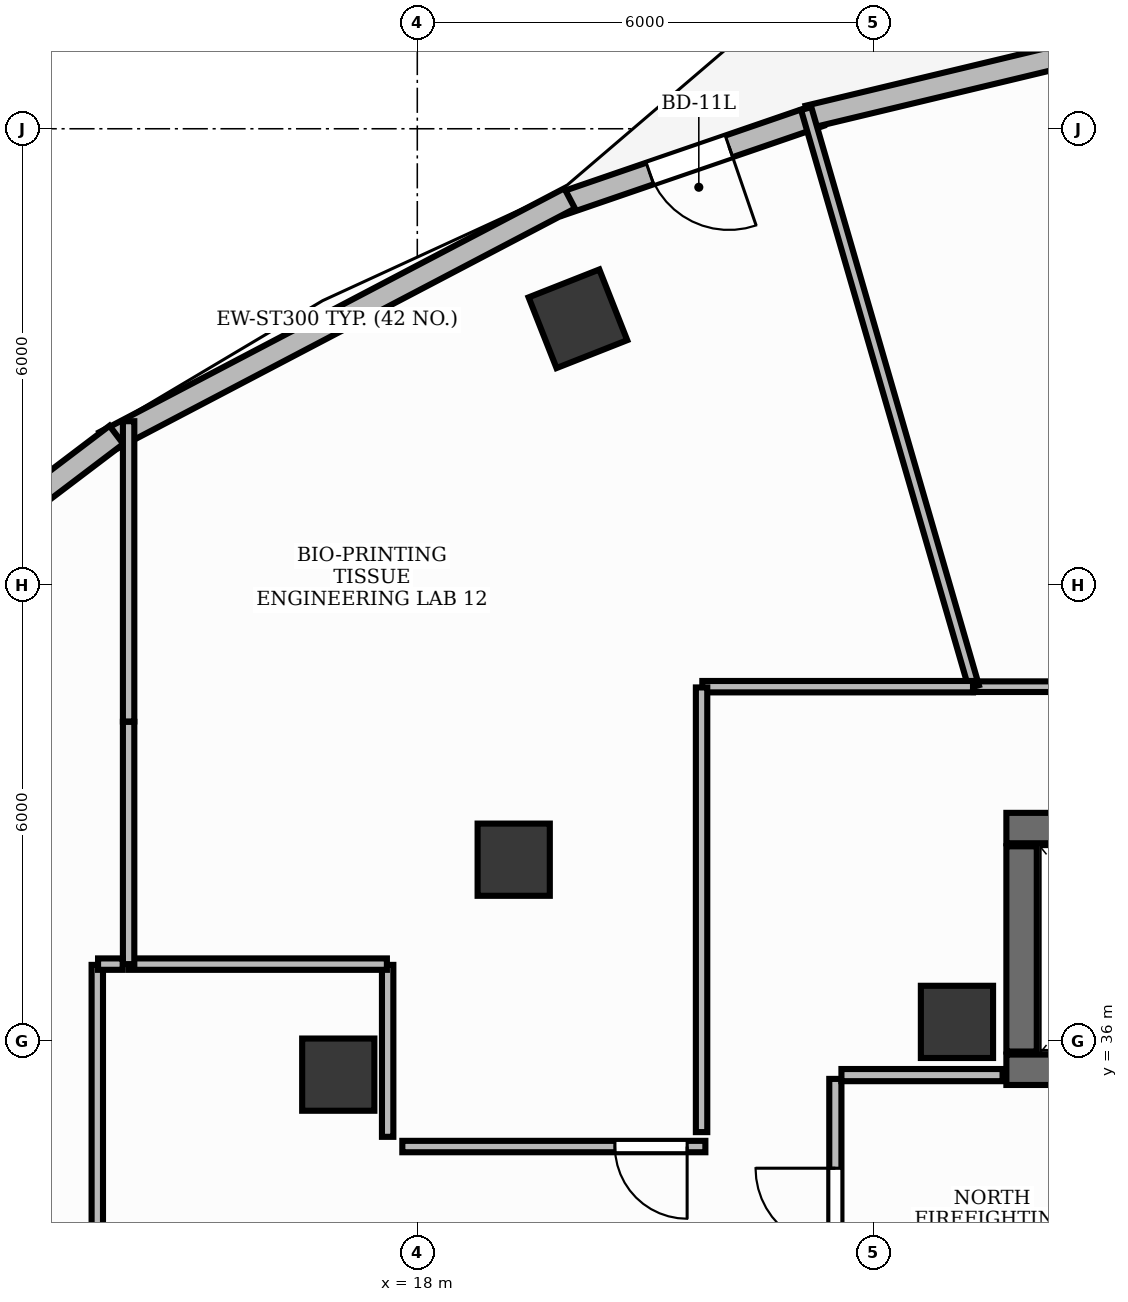
"""IFC4 building model, lengths in metres.
Left out: names, types, materials, properties, quantities, classifications, styles, units other than length and angle.
Written with IfcOpenShell. Run it as: python <this file> out.ifc"""

import sys

from ifc_helpers import new_model, si_unit, direction, frame, frame_2d, origin, origin_2d, place, context, subcontext, project, spatial, rectangle, extrude, element, fill, save


model = new_model("IFC4")
c1 = context("Model", 3, precision=1e-05, world=origin(), true_north=direction((0.0, 1.0)))
c2 = subcontext(c1, "Body", "Model", "MODEL_VIEW")
j1 = project(units=[si_unit("LENGTHUNIT", "METRE"), si_unit("PLANEANGLEUNIT", "RADIAN")], contexts=[c1])
p1 = place(None, origin())
s1 = spatial("IfcSite", under=j1, at=p1, CompositionType="ELEMENT")
p2 = place(p1, origin())
s2 = spatial("IfcBuilding", under=s1, at=p2, CompositionType="ELEMENT")
p3 = place(p2, frame((0.0, 0.0, 239.4)))
s3 = spatial("IfcBuildingStorey", under=s2, at=p3, CompositionType="ELEMENT", Elevation=239.4)
p4 = place(p3, frame((25.75, 38.8, 0.0), z_axis=(0.0, 0.0, 1.0), x_axis=(1.0, 0.0, 0.0)))
e1 = element("IfcWall", 1, at=p4, inside=s3, PredefinedType="SHEAR", context=c2, shape_type="SweptSolid", body=[
    extrude(rectangle(XDim=3.1, YDim=0.4, at=frame_2d((1.55, 0.0))), origin(), (0.0, 0.0, 1.0), 3.9),
])
p5 = place(p3, frame((25.75, 35.62, 0.0), z_axis=(0.0, 0.0, 1.0), x_axis=(1.0, 0.0, 0.0)))
e2 = element("IfcWall", 2, at=p5, inside=s3, PredefinedType="SHEAR", context=c2, shape_type="SweptSolid", body=[
    extrude(rectangle(XDim=3.1, YDim=0.4, at=frame_2d((1.55, 0.0))), origin(), (0.0, 0.0, 1.0), 3.9),
])
p6 = place(p5, frame((0.9, 0.0, 0.0)))
e3 = element("IfcOpeningElement", 3, at=p6, cuts=e2, PredefinedType="OPENING", context=c2, shape_type="SweptSolid", body=[
    extrude(rectangle(XDim=1.3, YDim=2.2, at=frame_2d((0.65, 1.1))), frame((0.0, 0.215, 0.0), z_axis=(0.0, -1.0, 0.0), x_axis=(1.0, 0.0, 0.0)), (0.0, 0.0, 1.0), 0.43),
])
p7 = place(p3, frame((25.95, 35.86, 0.0), z_axis=(0.0, 0.0, 1.0), x_axis=(0.0, 1.0, 0.0)))
e4 = element("IfcWall", 4, at=p7, inside=s3, PredefinedType="SHEAR", context=c2, shape_type="SweptSolid", body=[
    extrude(rectangle(XDim=2.7, YDim=0.4, at=frame_2d((1.35, 0.0))), origin(), (0.0, 0.0, 1.0), 3.9),
])
p8 = place(p3, frame((25.1, 36.25, -0.0), z_axis=(0.0, 0.0, 1.0), x_axis=(1.0, 0.0, 0.0)))
e5 = element("IfcColumn", 5, at=p8, inside=s3, PredefinedType="PILASTER", context=c2, shape_type="SweptSolid", body=[
    extrude(rectangle(XDim=0.95, YDim=0.95, at=origin_2d()), origin(), (0.0, 0.0, 1.0), 3.901),
])
p9 = place(p3, frame((20.113, 45.5, -0.0), z_axis=(0.0, 0.0, 1.0), x_axis=(0.930225540858, 0.366988341962, 0.0)))
e6 = element("IfcColumn", 6, at=p9, inside=s3, PredefinedType="COLUMN", context=c2, shape_type="SweptSolid", body=[
    extrude(rectangle(XDim=1.0, YDim=1.0, at=origin_2d()), origin(), (0.0, 0.0, 1.0), 3.901),
])
for number, where, z_axis, x_axis in (
    (7, (19.268, 38.384, -0.0), (0.0, 0.0, 1.0), (1.0, 0.0, 0.0)),
    (8, (16.96, 35.556, -0.0), (0.0, 0.0, 1.0), (1.0, 0.0, 0.0)),
):
    element("IfcColumn", number, at=place(p3, frame(where, z_axis=z_axis, x_axis=x_axis)), inside=s3, PredefinedType="COLUMN", context=c2, shape_type="SweptSolid", body=[
        extrude(rectangle(XDim=0.95, YDim=0.95, at=origin_2d()), origin(), (0.0, 0.0, 1.0), 3.901),
    ])
p10 = place(p3, frame((23.296, 48.18, 0.0), z_axis=(0.0, 0.0, 1.0), x_axis=(-0.945702753898, -0.325032769531, 0.0)))
e9 = element("IfcWall", 9, at=p10, inside=s3, PredefinedType="STANDARD", context=c2, shape_type="SweptSolid", body=[
    extrude(rectangle(XDim=3.629, YDim=0.3, at=frame_2d((1.815, 0.0))), origin(), (0.0, 0.0, 1.0), 3.9),
])
p11 = place(p10, frame((1.265, 0.0, 0.0)))
e10 = element("IfcOpeningElement", 10, at=p11, cuts=e9, PredefinedType="OPENING", context=c2, shape_type="SweptSolid", body=[
    extrude(rectangle(XDim=1.1, YDim=2.15, at=frame_2d((0.55, 1.075))), frame((0.0, 0.165, 0.0), z_axis=(0.0, -1.0, 0.0), x_axis=(1.0, 0.0, 0.0)), (0.0, 0.0, 1.0), 0.33),
])
p12 = place(p3, frame((26.775, 49.027, 0.0), z_axis=(0.0, 0.0, 1.0), x_axis=(-0.972475629939, -0.233004611918, 0.0)))
e11 = element("IfcWall", 11, at=p12, inside=s3, PredefinedType="STANDARD", context=c2, shape_type="SweptSolid", body=[
    extrude(rectangle(XDim=3.735, YDim=0.3, at=frame_2d((1.868, 0.0))), origin(), (0.0, 0.0, 1.0), 3.9),
])
p13 = place(p3, frame((20.004, 47.084, 0.0), z_axis=(0.0, 0.0, 1.0), x_axis=(-0.885549132128, -0.464545729274, 0.0)))
e12 = element("IfcWall", 12, at=p13, inside=s3, PredefinedType="STANDARD", context=c2, shape_type="SweptSolid", body=[
    extrude(rectangle(XDim=6.908, YDim=0.3, at=frame_2d((3.454, 0.0))), origin(), (0.0, 0.0, 1.0), 3.9),
])
p14 = place(p3, frame((14.041, 43.973, 0.0), z_axis=(0.0, 0.0, 1.0), x_axis=(-0.796917512891, -0.604088137317, 0.0)))
e13 = element("IfcWall", 13, at=p14, inside=s3, PredefinedType="STANDARD", context=c2, shape_type="SweptSolid", body=[
    extrude(rectangle(XDim=3.385, YDim=0.3, at=frame_2d((1.693, 0.0))), origin(), (0.0, 0.0, 1.0), 3.9),
])
p15 = place(p3, frame((23.5, 32.1, 0.0), z_axis=(0.0, 0.0, 1.0), x_axis=(0.0, 1.0, 0.0)))
e14 = element("IfcWall", 14, at=p15, inside=s3, PredefinedType="PARTITIONING", context=c2, shape_type="SweptSolid", body=[
    extrude(rectangle(XDim=3.4, YDim=0.16, at=frame_2d((1.7, 0.0))), origin(), (0.0, 0.0, 1.0), 2.22),
])
p16 = place(p15, frame((1.175, 0.0, 0.0)))
e15 = element("IfcOpeningElement", 15, at=p16, cuts=e14, PredefinedType="OPENING", context=c2, shape_type="SweptSolid", body=[
    extrude(rectangle(XDim=1.05, YDim=2.15, at=frame_2d((0.525, 1.075))), frame((0.0, 0.095, 0.0), z_axis=(0.0, -1.0, 0.0), x_axis=(1.0, 0.0, 0.0)), (0.0, 0.0, 1.0), 0.19),
])
p17 = place(p3, frame((23.58, 35.55, 0.0), z_axis=(0.0, 0.0, 1.0), x_axis=(1.0, 0.0, 0.0)))
e16 = element("IfcWall", 16, at=p17, inside=s3, PredefinedType="PARTITIONING", context=c2, shape_type="SweptSolid", body=[
    extrude(rectangle(XDim=2.12, YDim=0.16, at=frame_2d((1.06, 0.0))), origin(), (0.0, 0.0, 1.0), 2.22),
])
p18 = place(p3, frame((35.592, 40.66, 0.0), z_axis=(0.0, 0.0, 1.0), x_axis=(-1.0, 0.0, 0.0)))
e17 = element("IfcWall", 17, at=p18, inside=s3, PredefinedType="PARTITIONING", context=c2, shape_type="SweptSolid", body=[
    extrude(rectangle(XDim=10.271, YDim=0.14, at=frame_2d((5.135, 0.0))), origin(), (0.0, 0.0, 1.0), 2.22),
])
p19 = place(p18, frame((2.146, 0.0, 0.0)))
e18 = element("IfcOpeningElement", 18, at=p19, cuts=e17, PredefinedType="OPENING", context=c2, shape_type="SweptSolid", body=[
    extrude(rectangle(XDim=0.95, YDim=2.15, at=frame_2d((0.475, 1.075))), frame((0.0, 0.085, 0.0), z_axis=(0.0, -1.0, 0.0), x_axis=(1.0, 0.0, 0.0)), (0.0, 0.0, 1.0), 0.17),
])
p20 = place(p3, frame((21.79, 34.61, 0.0), z_axis=(0.0, 0.0, 1.0), x_axis=(-1.0, 0.0, 0.0)))
e19 = element("IfcWall", 19, at=p20, inside=s3, PredefinedType="PARTITIONING", context=c2, shape_type="SweptSolid", body=[
    extrude(rectangle(XDim=3.987, YDim=0.15, at=frame_2d((1.994, 0.0))), origin(), (0.0, 0.0, 1.0), 2.22),
])
p21 = place(p20, frame((0.24, 0.0, 0.0)))
e20 = element("IfcOpeningElement", 20, at=p21, cuts=e19, PredefinedType="OPENING", context=c2, shape_type="SweptSolid", body=[
    extrude(rectangle(XDim=0.95, YDim=2.15, at=frame_2d((0.475, 1.075))), frame((0.0, 0.09, 0.0), z_axis=(0.0, -1.0, 0.0), x_axis=(1.0, 0.0, 0.0)), (0.0, 0.0, 1.0), 0.18),
])
p22 = place(p3, frame((13.79, 37.0, 0.0), z_axis=(0.0, 0.0, 1.0), x_axis=(0.0, -1.0, 0.0)))
e21 = element("IfcWall", 21, at=p22, inside=s3, PredefinedType="PARTITIONING", context=c2, shape_type="SweptSolid", body=[
    extrude(rectangle(XDim=4.99, YDim=0.15, at=frame_2d((2.495, 0.0))), origin(), (0.0, 0.0, 1.0), 2.22),
])
p23 = place(p22, frame((3.529, 0.0, 0.0)))
e22 = element("IfcOpeningElement", 22, at=p23, cuts=e21, PredefinedType="OPENING", context=c2, shape_type="SweptSolid", body=[
    extrude(rectangle(XDim=0.95, YDim=2.15, at=frame_2d((0.475, 1.075))), frame((0.0, 0.09, 0.0), z_axis=(0.0, -1.0, 0.0), x_axis=(1.0, 0.0, 0.0)), (0.0, 0.0, 1.0), 0.18),
])
p24 = place(p3, frame((25.322, 40.66, 0.0), z_axis=(0.0, 0.0, 1.0), x_axis=(-0.278465296123, 0.960446291499, 0.0)))
e23 = element("IfcWall", 23, at=p24, inside=s3, PredefinedType="PARTITIONING", context=c2, shape_type="SweptSolid", body=[
    extrude(rectangle(XDim=7.919, YDim=0.14, at=frame_2d((3.959, 0.0))), origin(), (0.0, 0.0, 1.0), 2.22),
])
p25 = place(p3, frame((25.311, 40.66, 0.0), z_axis=(0.0, 0.0, 1.0), x_axis=(-1.0, 0.0, 0.0)))
e24 = element("IfcWall", 24, at=p25, inside=s3, PredefinedType="PARTITIONING", context=c2, shape_type="SweptSolid", body=[
    extrude(rectangle(XDim=3.561, YDim=0.15, at=frame_2d((1.781, 0.0))), origin(), (0.0, 0.0, 1.0), 2.22),
])
p26 = place(p3, frame((21.74, 40.65, 0.0), z_axis=(0.0, 0.0, 1.0), x_axis=(0.0, -1.0, 0.0)))
e25 = element("IfcWall", 25, at=p26, inside=s3, PredefinedType="PARTITIONING", context=c2, shape_type="SweptSolid", body=[
    extrude(rectangle(XDim=5.85, YDim=0.15, at=frame_2d((2.925, 0.0))), origin(), (0.0, 0.0, 1.0), 2.22),
])
p27 = place(p3, frame((17.61, 34.738, 0.0), z_axis=(0.0, 0.0, 1.0), x_axis=(0.0, 1.0, 0.0)))
e26 = element("IfcWall", 26, at=p27, inside=s3, PredefinedType="PARTITIONING", context=c2, shape_type="SweptSolid", body=[
    extrude(rectangle(XDim=2.262, YDim=0.15, at=frame_2d((1.131, 0.0))), origin(), (0.0, 0.0, 1.0), 2.22),
])
p28 = place(p3, frame((17.6, 37.01, 0.0), z_axis=(0.0, 0.0, 1.0), x_axis=(-1.0, 0.0, 0.0)))
e27 = element("IfcWall", 27, at=p28, inside=s3, PredefinedType="PARTITIONING", context=c2, shape_type="SweptSolid", body=[
    extrude(rectangle(XDim=3.398, YDim=0.15, at=frame_2d((1.699, 0.0))), origin(), (0.0, 0.0, 1.0), 2.22),
])
p29 = place(p3, frame((14.202, 37.01, 0.0), z_axis=(0.0, 0.0, 1.0), x_axis=(0.0, 1.0, 0.0)))
e28 = element("IfcWall", 28, at=p29, inside=s3, PredefinedType="PARTITIONING", context=c2, shape_type="SweptSolid", body=[
    extrude(rectangle(XDim=3.188, YDim=0.15, at=frame_2d((1.594, 0.0))), origin(), (0.0, 0.0, 1.0), 2.22),
])
p30 = place(p3, frame((14.202, 40.202, 0.0), z_axis=(0.0, 0.0, 1.0), x_axis=(0.0, 1.0, 0.0)))
e29 = element("IfcWall", 29, at=p30, inside=s3, PredefinedType="PARTITIONING", context=c2, shape_type="SweptSolid", body=[
    extrude(rectangle(XDim=3.95, YDim=0.15, at=frame_2d((1.975, 0.0))), origin(), (0.0, 0.0, 1.0), 2.22),
])
p31 = place(p3, frame((14.124, 37.01, 0.0), z_axis=(0.0, 0.0, 1.0), x_axis=(-1.0, 0.0, 0.0)))
e30 = element("IfcWall", 30, at=p31, inside=s3, PredefinedType="PARTITIONING", context=c2, shape_type="SweptSolid", body=[
    extrude(rectangle(XDim=0.324, YDim=0.15, at=frame_2d((0.162, 0.0))), origin(), (0.0, 0.0, 1.0), 2.22),
])
p32 = place(p11, origin())
e31 = element("IfcDoor", 31, at=p32, inside=s3, OperationType="SINGLE_SWING_LEFT", PredefinedType="DOOR", context=c2, shape_type="SweptSolid", body=[
    extrude(rectangle(XDim=1.1, YDim=2.15, at=frame_2d((0.55, 1.075))), frame((0.0, 0.025, 0.0), z_axis=(0.0, -1.0, 0.0), x_axis=(1.0, 0.0, 0.0)), (0.0, 0.0, 1.0), 0.05),
])
fill(e10, e31)
p33 = place(p16, origin())
e32 = element("IfcDoor", 32, at=p33, inside=s3, OperationType="SINGLE_SWING_RIGHT", PredefinedType="DOOR", context=c2, shape_type="SweptSolid", body=[
    extrude(rectangle(XDim=1.05, YDim=2.15, at=frame_2d((0.525, 1.075))), frame((0.0, 0.025, 0.0), z_axis=(0.0, -1.0, 0.0), x_axis=(1.0, 0.0, 0.0)), (0.0, 0.0, 1.0), 0.05),
])
fill(e15, e32)
p34 = place(p21, origin())
e33 = element("IfcDoor", 33, at=p34, inside=s3, OperationType="SINGLE_SWING_LEFT", PredefinedType="DOOR", context=c2, shape_type="SweptSolid", body=[
    extrude(rectangle(XDim=0.95, YDim=2.15, at=frame_2d((0.475, 1.075))), frame((0.0, 0.025, 0.0), z_axis=(0.0, -1.0, 0.0), x_axis=(1.0, 0.0, 0.0)), (0.0, 0.0, 1.0), 0.05),
])
fill(e20, e33)
save(model, sys.argv[1])
